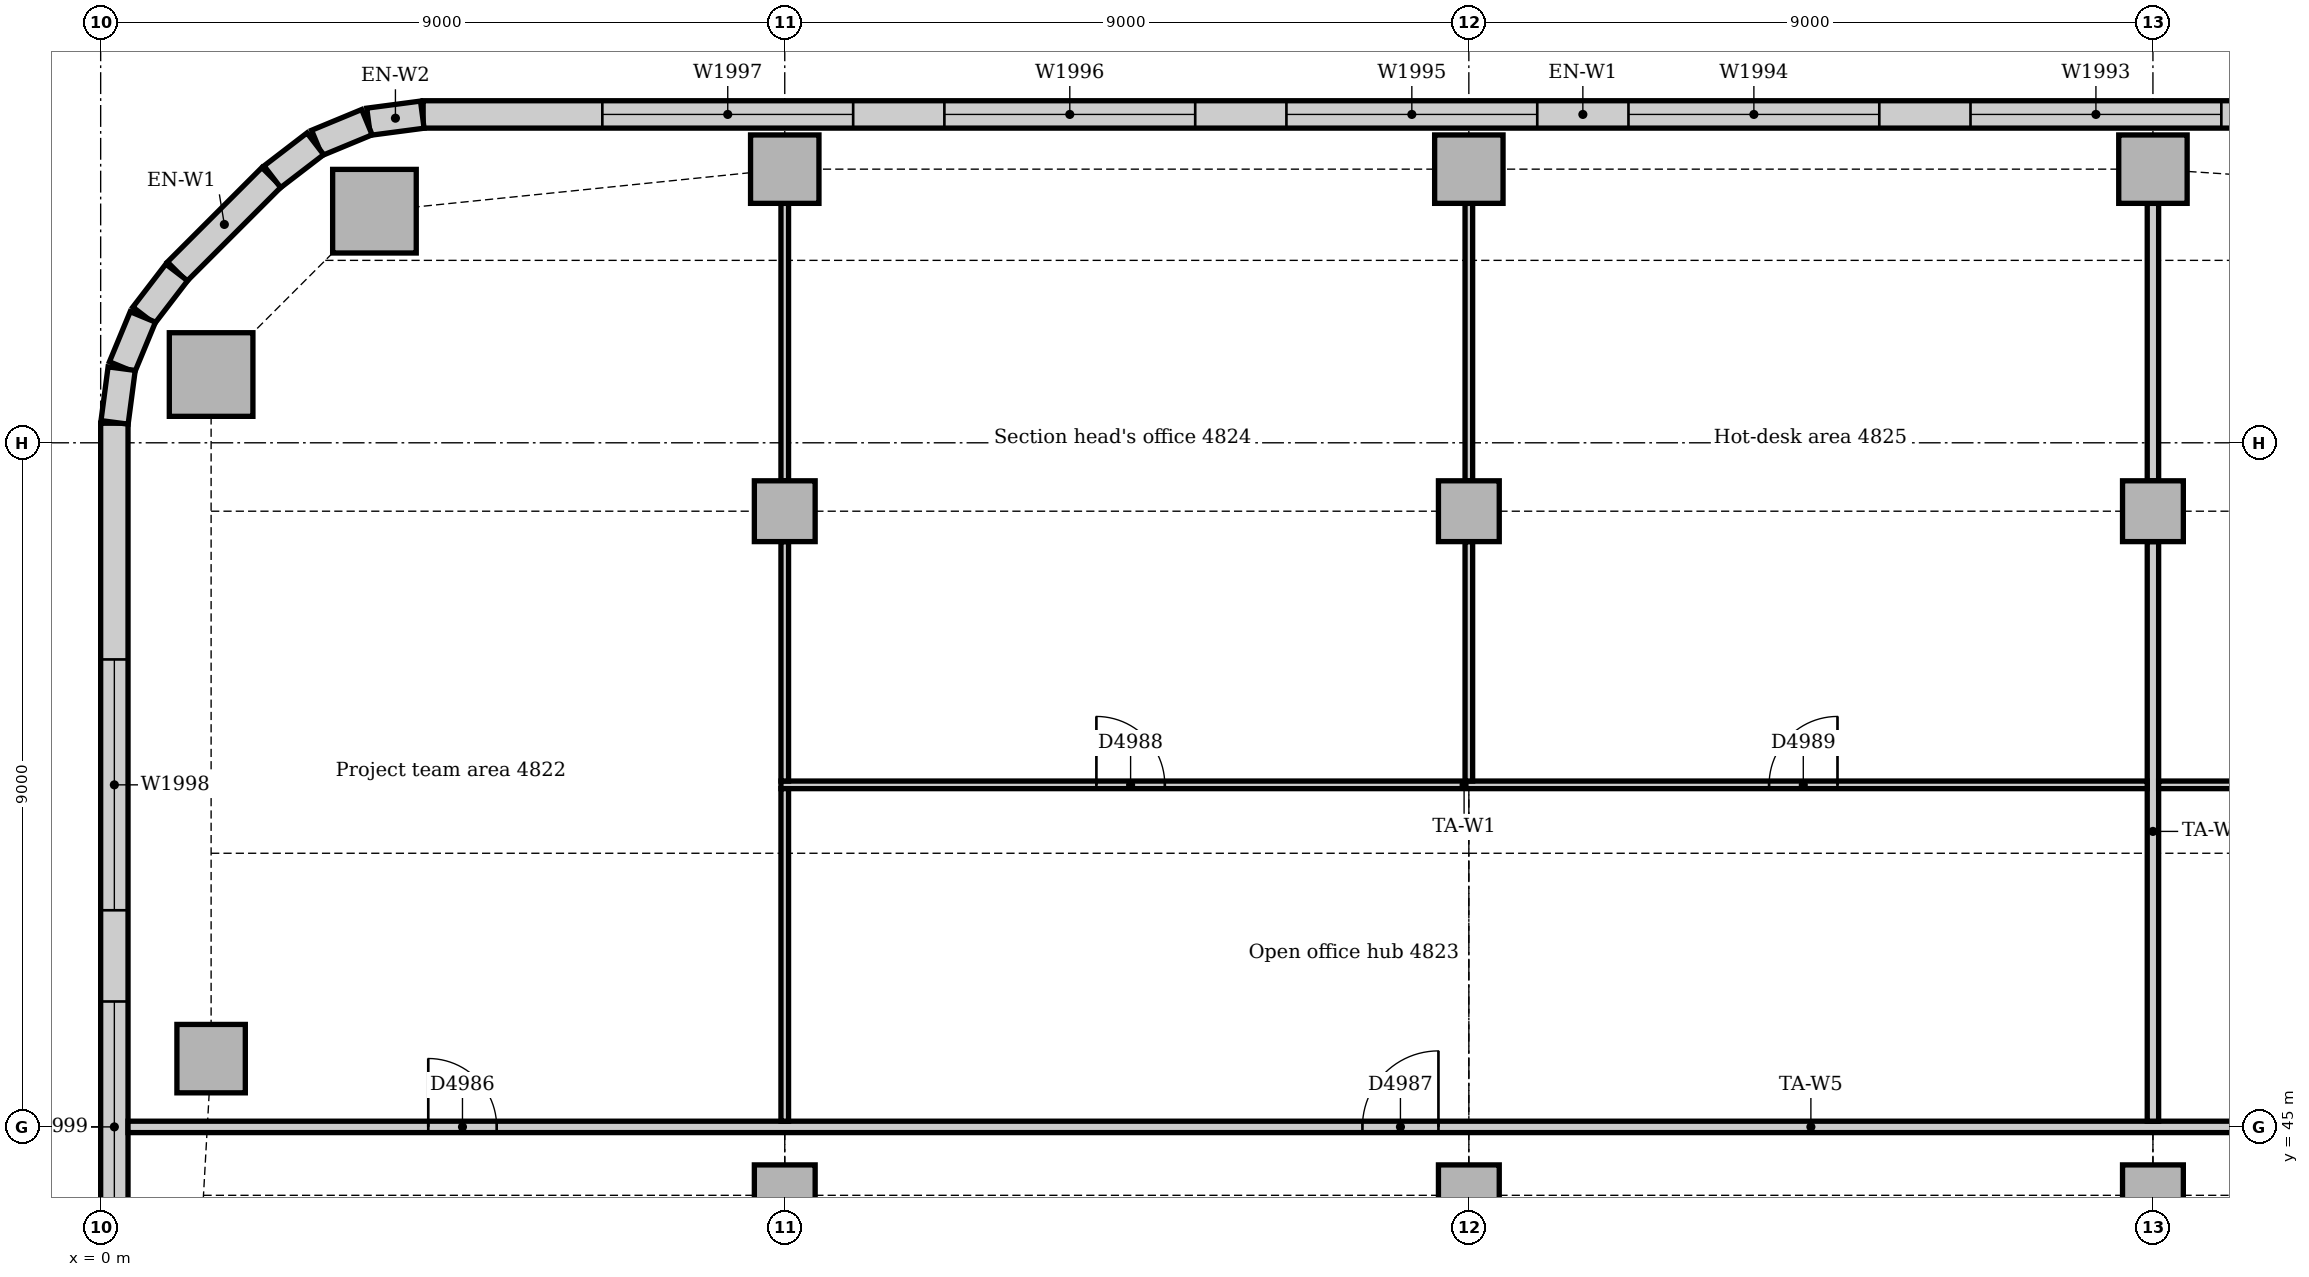
"""IFC4 building model, lengths in metres.
Left out: names, types, materials, properties, quantities, classifications, styles, units other than length and angle.
Written with IfcOpenShell. Run it as: python <this file> out.ifc"""

import sys

from ifc_helpers import new_model, si_unit, direction, frame, frame_2d, origin, origin_2d, place, context, subcontext, project, spatial, rectangle, extrude, element, fill, save


model = new_model("IFC4")
c1 = context("Model", 3, precision=1e-05, world=origin(), true_north=direction((0.0, 1.0)))
c2 = subcontext(c1, "Body", "Model", "MODEL_VIEW")
j1 = project(units=[si_unit("LENGTHUNIT", "METRE"), si_unit("PLANEANGLEUNIT", "RADIAN")], contexts=[c1])
p1 = place(None, origin())
s1 = spatial("IfcSite", under=j1, at=p1, CompositionType="ELEMENT")
p2 = place(p1, origin())
s2 = spatial("IfcBuilding", under=s1, at=p2, CompositionType="ELEMENT")
p3 = place(p2, frame((0.0, 0.0, 202.0)))
s3 = spatial("IfcBuildingStorey", under=s2, at=p3, CompositionType="ELEMENT", Elevation=202.0)
for number, where, z_axis, x_axis in (
    (1, (3.602, 57.047, 0.0), (0.0, 0.0, 1.0), (1.0, 0.0, 0.0)),
    (2, (1.453, 54.898, 0.0), (0.0, 0.0, 1.0), (1.0, 0.0, 0.0)),
):
    element("IfcColumn", number, at=place(p3, frame(where, z_axis=z_axis, x_axis=x_axis)), inside=s3, PredefinedType="COLUMN", context=c2, shape_type="SweptSolid", body=[
        extrude(rectangle(XDim=1.1, YDim=1.1, at=origin_2d()), origin(), (0.0, 0.0, 1.0), 3.85),
    ])
for number, where, z_axis, x_axis in (
    (3, (9.0, 57.6, 0.0), (0.0, 0.0, 1.0), (1.0, 0.0, 0.0)),
    (4, (18.0, 57.6, 0.0), (0.0, 0.0, 1.0), (1.0, 0.0, 0.0)),
    (5, (27.0, 57.6, 0.0), (0.0, 0.0, 1.0), (1.0, 0.0, 0.0)),
    (6, (1.453, 45.898, 0.0), (0.0, 0.0, 1.0), (1.0, 0.0, 0.0)),
):
    element("IfcColumn", number, at=place(p3, frame(where, z_axis=z_axis, x_axis=x_axis)), inside=s3, PredefinedType="COLUMN", context=c2, shape_type="SweptSolid", body=[
        extrude(rectangle(XDim=0.9, YDim=0.9, at=origin_2d()), origin(), (0.0, 0.0, 1.0), 3.85),
    ])
for number, where, z_axis, x_axis in (
    (7, (9.0, 44.1, 0.0), (0.0, 0.0, 1.0), (1.0, 0.0, 0.0)),
    (8, (9.0, 53.1, 0.0), (0.0, 0.0, 1.0), (1.0, 0.0, 0.0)),
    (9, (18.0, 44.1, 0.0), (0.0, 0.0, 1.0), (1.0, 0.0, 0.0)),
    (10, (18.0, 53.1, 0.0), (0.0, 0.0, 1.0), (1.0, 0.0, 0.0)),
    (11, (27.0, 44.1, 0.0), (0.0, 0.0, 1.0), (1.0, 0.0, 0.0)),
    (12, (27.0, 53.1, 0.0), (0.0, 0.0, 1.0), (1.0, 0.0, 0.0)),
):
    element("IfcColumn", number, at=place(p3, frame(where, z_axis=z_axis, x_axis=x_axis)), inside=s3, PredefinedType="COLUMN", context=c2, shape_type="SweptSolid", body=[
        extrude(rectangle(XDim=0.8, YDim=0.8, at=origin_2d()), origin(), (0.0, 0.0, 1.0), 3.85),
    ])
p4 = place(p3, frame((34.757, 58.32, 0.0), z_axis=(0.0, 0.0, 1.0), x_axis=(-1.0, 0.0, 0.0)))
e13 = element("IfcWall", 13, at=p4, inside=s3, PredefinedType="STANDARD", context=c2, shape_type="SweptSolid", body=[
    extrude(rectangle(XDim=30.515, YDim=0.36, at=frame_2d((15.257, 0.0))), origin(), (0.0, 0.0, 1.0), 3.85),
])
p5 = place(p4, frame((2.357, 0.0, 0.9)))
e14 = element("IfcOpeningElement", 14, at=p5, cuts=e13, PredefinedType="OPENING", context=c2, shape_type="SweptSolid", body=[
    extrude(rectangle(XDim=3.3, YDim=1.6, at=frame_2d((1.65, 0.8))), frame((0.0, 0.19, 0.0), z_axis=(0.0, -1.0, 0.0), x_axis=(1.0, 0.0, 0.0)), (0.0, 0.0, 1.0), 0.38),
])
p6 = place(p4, frame((6.857, 0.0, 0.9)))
e15 = element("IfcOpeningElement", 15, at=p6, cuts=e13, PredefinedType="OPENING", context=c2, shape_type="SweptSolid", body=[
    extrude(rectangle(XDim=3.3, YDim=1.6, at=frame_2d((1.65, 0.8))), frame((0.0, 0.19, 0.0), z_axis=(0.0, -1.0, 0.0), x_axis=(1.0, 0.0, 0.0)), (0.0, 0.0, 1.0), 0.38),
])
p7 = place(p4, frame((11.357, 0.0, 0.9)))
e16 = element("IfcOpeningElement", 16, at=p7, cuts=e13, PredefinedType="OPENING", context=c2, shape_type="SweptSolid", body=[
    extrude(rectangle(XDim=3.3, YDim=1.6, at=frame_2d((1.65, 0.8))), frame((0.0, 0.19, 0.0), z_axis=(0.0, -1.0, 0.0), x_axis=(1.0, 0.0, 0.0)), (0.0, 0.0, 1.0), 0.38),
])
p8 = place(p4, frame((15.857, 0.0, 0.9)))
e17 = element("IfcOpeningElement", 17, at=p8, cuts=e13, PredefinedType="OPENING", context=c2, shape_type="SweptSolid", body=[
    extrude(rectangle(XDim=3.3, YDim=1.6, at=frame_2d((1.65, 0.8))), frame((0.0, 0.19, 0.0), z_axis=(0.0, -1.0, 0.0), x_axis=(1.0, 0.0, 0.0)), (0.0, 0.0, 1.0), 0.38),
])
p9 = place(p4, frame((20.357, 0.0, 0.9)))
e18 = element("IfcOpeningElement", 18, at=p9, cuts=e13, PredefinedType="OPENING", context=c2, shape_type="SweptSolid", body=[
    extrude(rectangle(XDim=3.3, YDim=1.6, at=frame_2d((1.65, 0.8))), frame((0.0, 0.19, 0.0), z_axis=(0.0, -1.0, 0.0), x_axis=(1.0, 0.0, 0.0)), (0.0, 0.0, 1.0), 0.38),
])
p10 = place(p4, frame((24.857, 0.0, 0.9)))
e19 = element("IfcOpeningElement", 19, at=p10, cuts=e13, PredefinedType="OPENING", context=c2, shape_type="SweptSolid", body=[
    extrude(rectangle(XDim=3.3, YDim=1.6, at=frame_2d((1.65, 0.8))), frame((0.0, 0.19, 0.0), z_axis=(0.0, -1.0, 0.0), x_axis=(1.0, 0.0, 0.0)), (0.0, 0.0, 1.0), 0.38),
])
p11 = place(p3, frame((2.249, 57.494, 0.0), z_axis=(0.0, 0.0, 1.0), x_axis=(-0.707106781187, -0.707106781187, 0.0)))
e20 = element("IfcWall", 20, at=p11, inside=s3, PredefinedType="STANDARD", context=c2, shape_type="SweptSolid", body=[
    extrude(rectangle(XDim=1.757, YDim=0.36, at=frame_2d((0.879, 0.0))), origin(), (0.0, 0.0, 1.0), 3.85),
])
p12 = place(p3, frame((0.18, 54.257, 0.0), z_axis=(0.0, 0.0, 1.0), x_axis=(0.0, -1.0, 0.0)))
e21 = element("IfcWall", 21, at=p12, inside=s3, PredefinedType="STANDARD", context=c2, shape_type="SweptSolid", body=[
    extrude(rectangle(XDim=12.257, YDim=0.36, at=frame_2d((6.129, 0.0))), origin(), (0.0, 0.0, 1.0), 3.85),
])
p13 = place(p12, frame((3.107, 0.0, 0.9)))
e22 = element("IfcOpeningElement", 22, at=p13, cuts=e21, PredefinedType="OPENING", context=c2, shape_type="SweptSolid", body=[
    extrude(rectangle(XDim=3.3, YDim=1.6, at=frame_2d((1.65, 0.8))), frame((0.0, 0.19, 0.0), z_axis=(0.0, -1.0, 0.0), x_axis=(1.0, 0.0, 0.0)), (0.0, 0.0, 1.0), 0.38),
])
p14 = place(p12, frame((7.607, 0.0, 0.9)))
e23 = element("IfcOpeningElement", 23, at=p14, cuts=e21, PredefinedType="OPENING", context=c2, shape_type="SweptSolid", body=[
    extrude(rectangle(XDim=3.3, YDim=1.6, at=frame_2d((1.65, 0.8))), frame((0.0, 0.19, 0.0), z_axis=(0.0, -1.0, 0.0), x_axis=(1.0, 0.0, 0.0)), (0.0, 0.0, 1.0), 0.38),
])
for number, where, z_axis, x_axis in (
    (24, (4.231, 58.317, 0.0), (0.0, 0.0, 1.0), (-0.991, -0.131, 0.0)),
    (25, (3.503, 58.218, 0.0), (0.0, 0.0, 1.0), (-0.924, -0.383, 0.0)),
):
    element("IfcWall", number, at=place(p3, frame(where, z_axis=z_axis, x_axis=x_axis)), inside=s3, PredefinedType="STANDARD", context=c2, shape_type="SweptSolid", body=[
        extrude(rectangle(XDim=0.713, YDim=0.36, at=frame_2d((0.356, 0.0))), origin(), (0.0, 0.0, 1.0), 3.85),
    ])
for number, where, z_axis, x_axis in (
    (26, (2.825, 57.934, 0.0), (0.0, 0.0, 1.0), (-0.793, -0.609, 0.0)),
    (27, (1.0, 56.241, 0.0), (0.0, 0.0, 1.0), (-0.609, -0.793, 0.0)),
):
    element("IfcWall", number, at=place(p3, frame(where, z_axis=z_axis, x_axis=x_axis)), inside=s3, PredefinedType="STANDARD", context=c2, shape_type="SweptSolid", body=[
        extrude(rectangle(XDim=0.713, YDim=0.36, at=frame_2d((0.357, 0.0))), origin(), (0.0, 0.0, 1.0), 3.85),
    ])
for number, where, z_axis, x_axis in (
    (28, (0.555, 55.656, 0.0), (0.0, 0.0, 1.0), (-0.383, -0.924, 0.0)),
    (29, (0.276, 54.976, 0.0), (0.0, 0.0, 1.0), (-0.131, -0.991, 0.0)),
):
    element("IfcWall", number, at=place(p3, frame(where, z_axis=z_axis, x_axis=x_axis)), inside=s3, PredefinedType="STANDARD", context=c2, shape_type="SweptSolid", body=[
        extrude(rectangle(XDim=0.713, YDim=0.36, at=frame_2d((0.356, 0.0))), origin(), (0.0, 0.0, 1.0), 3.85),
    ])
p15 = place(p3, frame((0.36, 45.0, 0.0), z_axis=(0.0, 0.0, 1.0), x_axis=(1.0, 0.0, 0.0)))
e30 = element("IfcWall", 30, at=p15, inside=s3, PredefinedType="PARTITIONING", context=c2, shape_type="SweptSolid", body=[
    extrude(rectangle(XDim=44.28, YDim=0.15, at=frame_2d((22.14, 0.0))), origin(), (0.0, 0.0, 1.0), 3.85),
])
p16 = place(p15, frame((3.95, 0.0, 0.0)))
e31 = element("IfcOpeningElement", 31, at=p16, cuts=e30, PredefinedType="OPENING", context=c2, shape_type="SweptSolid", body=[
    extrude(rectangle(XDim=0.9, YDim=2.1, at=frame_2d((0.45, 1.05))), frame((0.0, 0.085, 0.0), z_axis=(0.0, -1.0, 0.0), x_axis=(1.0, 0.0, 0.0)), (0.0, 0.0, 1.0), 0.17),
])
p17 = place(p15, frame((16.24, 0.0, 0.0)))
e32 = element("IfcOpeningElement", 32, at=p17, cuts=e30, PredefinedType="OPENING", context=c2, shape_type="SweptSolid", body=[
    extrude(rectangle(XDim=1.0, YDim=2.1, at=frame_2d((0.5, 1.05))), frame((0.0, 0.085, 0.0), z_axis=(0.0, -1.0, 0.0), x_axis=(1.0, 0.0, 0.0)), (0.0, 0.0, 1.0), 0.17),
])
p18 = place(p15, frame((34.24, 0.0, 0.0)))
e33 = element("IfcOpeningElement", 33, at=p18, cuts=e30, PredefinedType="OPENING", context=c2, shape_type="SweptSolid", body=[
    extrude(rectangle(XDim=1.0, YDim=2.1, at=frame_2d((0.5, 1.05))), frame((0.0, 0.085, 0.0), z_axis=(0.0, -1.0, 0.0), x_axis=(1.0, 0.0, 0.0)), (0.0, 0.0, 1.0), 0.17),
])
p19 = place(p3, frame((27.0, 45.075, 0.0), z_axis=(0.0, 0.0, 1.0), x_axis=(0.0, 1.0, 0.0)))
e34 = element("IfcWall", 34, at=p19, inside=s3, PredefinedType="PARTITIONING", context=c2, shape_type="SweptSolid", body=[
    extrude(rectangle(XDim=7.625, YDim=0.15, at=frame_2d((3.812, 0.0))), origin(), (0.0, 0.0, 1.0), 3.35),
])
p20 = place(p3, frame((27.0, 53.5, 0.0), z_axis=(0.0, 0.0, 1.0), x_axis=(0.0, 1.0, 0.0)))
e35 = element("IfcWall", 35, at=p20, inside=s3, PredefinedType="PARTITIONING", context=c2, shape_type="SweptSolid", body=[
    extrude(rectangle(XDim=3.65, YDim=0.15, at=frame_2d((1.825, 0.0))), origin(), (0.0, 0.0, 1.0), 3.41),
])
p21 = place(p3, frame((8.95, 49.5, 0.0), z_axis=(0.0, 0.0, 1.0), x_axis=(1.0, 0.0, 0.0)))
e36 = element("IfcWall", 36, at=p21, inside=s3, PredefinedType="PARTITIONING", context=c2, shape_type="SweptSolid", body=[
    extrude(rectangle(XDim=17.975, YDim=0.1, at=frame_2d((8.988, 0.0))), origin(), (0.0, 0.0, 1.0), 3.85),
])
p22 = place(p21, frame((4.15, 0.0, 0.0)))
e37 = element("IfcOpeningElement", 37, at=p22, cuts=e36, PredefinedType="OPENING", context=c2, shape_type="SweptSolid", body=[
    extrude(rectangle(XDim=0.9, YDim=2.1, at=frame_2d((0.45, 1.05))), frame((0.0, 0.06, 0.0), z_axis=(0.0, -1.0, 0.0), x_axis=(1.0, 0.0, 0.0)), (0.0, 0.0, 1.0), 0.12),
])
p23 = place(p21, frame((13.0, 0.0, 0.0)))
e38 = element("IfcOpeningElement", 38, at=p23, cuts=e36, PredefinedType="OPENING", context=c2, shape_type="SweptSolid", body=[
    extrude(rectangle(XDim=0.9, YDim=2.1, at=frame_2d((0.45, 1.05))), frame((0.0, 0.06, 0.0), z_axis=(0.0, -1.0, 0.0), x_axis=(1.0, 0.0, 0.0)), (0.0, 0.0, 1.0), 0.12),
])
p24 = place(p3, frame((27.075, 49.5, 0.0), z_axis=(0.0, 0.0, 1.0), x_axis=(1.0, 0.0, 0.0)))
e39 = element("IfcWall", 39, at=p24, inside=s3, PredefinedType="PARTITIONING", context=c2, shape_type="SweptSolid", body=[
    extrude(rectangle(XDim=17.24, YDim=0.1, at=frame_2d((8.62, 0.0))), origin(), (0.0, 0.0, 1.0), 3.85),
])
p25 = place(p24, frame((4.1, 0.0, 0.0)))
e40 = element("IfcOpeningElement", 40, at=p25, cuts=e39, PredefinedType="OPENING", context=c2, shape_type="SweptSolid", body=[
    extrude(rectangle(XDim=0.9, YDim=2.1, at=frame_2d((0.45, 1.05))), frame((0.0, 0.06, 0.0), z_axis=(0.0, -1.0, 0.0), x_axis=(1.0, 0.0, 0.0)), (0.0, 0.0, 1.0), 0.12),
])
p26 = place(p24, frame((12.575, 0.0, 0.0)))
e41 = element("IfcOpeningElement", 41, at=p26, cuts=e39, PredefinedType="OPENING", context=c2, shape_type="SweptSolid", body=[
    extrude(rectangle(XDim=0.9, YDim=2.1, at=frame_2d((0.45, 1.05))), frame((0.0, 0.06, 0.0), z_axis=(0.0, -1.0, 0.0), x_axis=(1.0, 0.0, 0.0)), (0.0, 0.0, 1.0), 0.12),
])
p27 = place(p3, frame((9.0, 45.075, 0.0), z_axis=(0.0, 0.0, 1.0), x_axis=(0.0, 1.0, 0.0)))
e42 = element("IfcWall", 42, at=p27, inside=s3, PredefinedType="PARTITIONING", context=c2, shape_type="SweptSolid", body=[
    extrude(rectangle(XDim=4.375, YDim=0.1, at=frame_2d((2.188, 0.0))), origin(), (0.0, 0.0, 1.0), 3.35),
])
p28 = place(p3, frame((9.0, 49.55, 0.0), z_axis=(0.0, 0.0, 1.0), x_axis=(0.0, 1.0, 0.0)))
e43 = element("IfcWall", 43, at=p28, inside=s3, PredefinedType="PARTITIONING", context=c2, shape_type="SweptSolid", body=[
    extrude(rectangle(XDim=3.15, YDim=0.1, at=frame_2d((1.575, 0.0))), origin(), (0.0, 0.0, 1.0), 3.35),
])
p29 = place(p3, frame((9.0, 53.5, 0.0), z_axis=(0.0, 0.0, 1.0), x_axis=(0.0, 1.0, 0.0)))
e44 = element("IfcWall", 44, at=p29, inside=s3, PredefinedType="PARTITIONING", context=c2, shape_type="SweptSolid", body=[
    extrude(rectangle(XDim=3.65, YDim=0.1, at=frame_2d((1.825, 0.0))), origin(), (0.0, 0.0, 1.0), 3.41),
])
p30 = place(p3, frame((18.0, 49.55, 0.0), z_axis=(0.0, 0.0, 1.0), x_axis=(0.0, 1.0, 0.0)))
e45 = element("IfcWall", 45, at=p30, inside=s3, PredefinedType="PARTITIONING", context=c2, shape_type="SweptSolid", body=[
    extrude(rectangle(XDim=3.15, YDim=0.1, at=frame_2d((1.575, 0.0))), origin(), (0.0, 0.0, 1.0), 3.35),
])
p31 = place(p3, frame((18.0, 53.5, 0.0), z_axis=(0.0, 0.0, 1.0), x_axis=(0.0, 1.0, 0.0)))
e46 = element("IfcWall", 46, at=p31, inside=s3, PredefinedType="PARTITIONING", context=c2, shape_type="SweptSolid", body=[
    extrude(rectangle(XDim=3.65, YDim=0.1, at=frame_2d((1.825, 0.0))), origin(), (0.0, 0.0, 1.0), 3.41),
])
p32 = place(p6, origin())
e47 = element("IfcWindow", 47, at=p32, inside=s3, PartitioningType="SINGLE_PANEL", PredefinedType="WINDOW", context=c2, shape_type="SweptSolid", body=[
    extrude(rectangle(XDim=3.3, YDim=1.6, at=frame_2d((1.65, 0.8))), frame((0.0, 0.13, 0.0), z_axis=(0.0, -1.0, 0.0), x_axis=(1.0, 0.0, 0.0)), (0.0, 0.0, 1.0), 0.06),
])
fill(e15, e47)
p33 = place(p7, origin())
e48 = element("IfcWindow", 48, at=p33, inside=s3, PartitioningType="SINGLE_PANEL", PredefinedType="WINDOW", context=c2, shape_type="SweptSolid", body=[
    extrude(rectangle(XDim=3.3, YDim=1.6, at=frame_2d((1.65, 0.8))), frame((0.0, 0.13, 0.0), z_axis=(0.0, -1.0, 0.0), x_axis=(1.0, 0.0, 0.0)), (0.0, 0.0, 1.0), 0.06),
])
fill(e16, e48)
p34 = place(p8, origin())
e49 = element("IfcWindow", 49, at=p34, inside=s3, PartitioningType="SINGLE_PANEL", PredefinedType="WINDOW", context=c2, shape_type="SweptSolid", body=[
    extrude(rectangle(XDim=3.3, YDim=1.6, at=frame_2d((1.65, 0.8))), frame((0.0, 0.13, 0.0), z_axis=(0.0, -1.0, 0.0), x_axis=(1.0, 0.0, 0.0)), (0.0, 0.0, 1.0), 0.06),
])
fill(e17, e49)
p35 = place(p9, origin())
e50 = element("IfcWindow", 50, at=p35, inside=s3, PartitioningType="SINGLE_PANEL", PredefinedType="WINDOW", context=c2, shape_type="SweptSolid", body=[
    extrude(rectangle(XDim=3.3, YDim=1.6, at=frame_2d((1.65, 0.8))), frame((0.0, 0.13, 0.0), z_axis=(0.0, -1.0, 0.0), x_axis=(1.0, 0.0, 0.0)), (0.0, 0.0, 1.0), 0.06),
])
fill(e18, e50)
p36 = place(p10, origin())
e51 = element("IfcWindow", 51, at=p36, inside=s3, PartitioningType="SINGLE_PANEL", PredefinedType="WINDOW", context=c2, shape_type="SweptSolid", body=[
    extrude(rectangle(XDim=3.3, YDim=1.6, at=frame_2d((1.65, 0.8))), frame((0.0, 0.13, 0.0), z_axis=(0.0, -1.0, 0.0), x_axis=(1.0, 0.0, 0.0)), (0.0, 0.0, 1.0), 0.06),
])
fill(e19, e51)
p37 = place(p13, origin())
e52 = element("IfcWindow", 52, at=p37, inside=s3, PartitioningType="SINGLE_PANEL", PredefinedType="WINDOW", context=c2, shape_type="SweptSolid", body=[
    extrude(rectangle(XDim=3.3, YDim=1.6, at=frame_2d((1.65, 0.8))), frame((0.0, 0.13, 0.0), z_axis=(0.0, -1.0, 0.0), x_axis=(1.0, 0.0, 0.0)), (0.0, 0.0, 1.0), 0.06),
])
fill(e22, e52)
p38 = place(p14, origin())
e53 = element("IfcWindow", 53, at=p38, inside=s3, PartitioningType="SINGLE_PANEL", PredefinedType="WINDOW", context=c2, shape_type="SweptSolid", body=[
    extrude(rectangle(XDim=3.3, YDim=1.6, at=frame_2d((1.65, 0.8))), frame((0.0, 0.13, 0.0), z_axis=(0.0, -1.0, 0.0), x_axis=(1.0, 0.0, 0.0)), (0.0, 0.0, 1.0), 0.06),
])
fill(e23, e53)
p39 = place(p16, origin())
e54 = element("IfcDoor", 54, at=p39, inside=s3, OperationType="SINGLE_SWING_LEFT", PredefinedType="DOOR", context=c2, shape_type="SweptSolid", body=[
    extrude(rectangle(XDim=0.9, YDim=2.1, at=frame_2d((0.45, 1.05))), frame((0.0, 0.025, 0.0), z_axis=(0.0, -1.0, 0.0), x_axis=(1.0, 0.0, 0.0)), (0.0, 0.0, 1.0), 0.05),
])
fill(e31, e54)
p40 = place(p17, origin())
e55 = element("IfcDoor", 55, at=p40, inside=s3, OperationType="SINGLE_SWING_RIGHT", PredefinedType="DOOR", context=c2, shape_type="SweptSolid", body=[
    extrude(rectangle(XDim=1.0, YDim=2.1, at=frame_2d((0.5, 1.05))), frame((0.0, 0.025, 0.0), z_axis=(0.0, -1.0, 0.0), x_axis=(1.0, 0.0, 0.0)), (0.0, 0.0, 1.0), 0.05),
])
fill(e32, e55)
p41 = place(p22, origin())
e56 = element("IfcDoor", 56, at=p41, inside=s3, OperationType="SINGLE_SWING_LEFT", PredefinedType="DOOR", context=c2, shape_type="SweptSolid", body=[
    extrude(rectangle(XDim=0.9, YDim=2.1, at=frame_2d((0.45, 1.05))), frame((0.0, 0.025, 0.0), z_axis=(0.0, -1.0, 0.0), x_axis=(1.0, 0.0, 0.0)), (0.0, 0.0, 1.0), 0.05),
])
fill(e37, e56)
p42 = place(p23, origin())
e57 = element("IfcDoor", 57, at=p42, inside=s3, OperationType="SINGLE_SWING_RIGHT", PredefinedType="DOOR", context=c2, shape_type="SweptSolid", body=[
    extrude(rectangle(XDim=0.9, YDim=2.1, at=frame_2d((0.45, 1.05))), frame((0.0, 0.025, 0.0), z_axis=(0.0, -1.0, 0.0), x_axis=(1.0, 0.0, 0.0)), (0.0, 0.0, 1.0), 0.05),
])
fill(e38, e57)
save(model, sys.argv[1])
